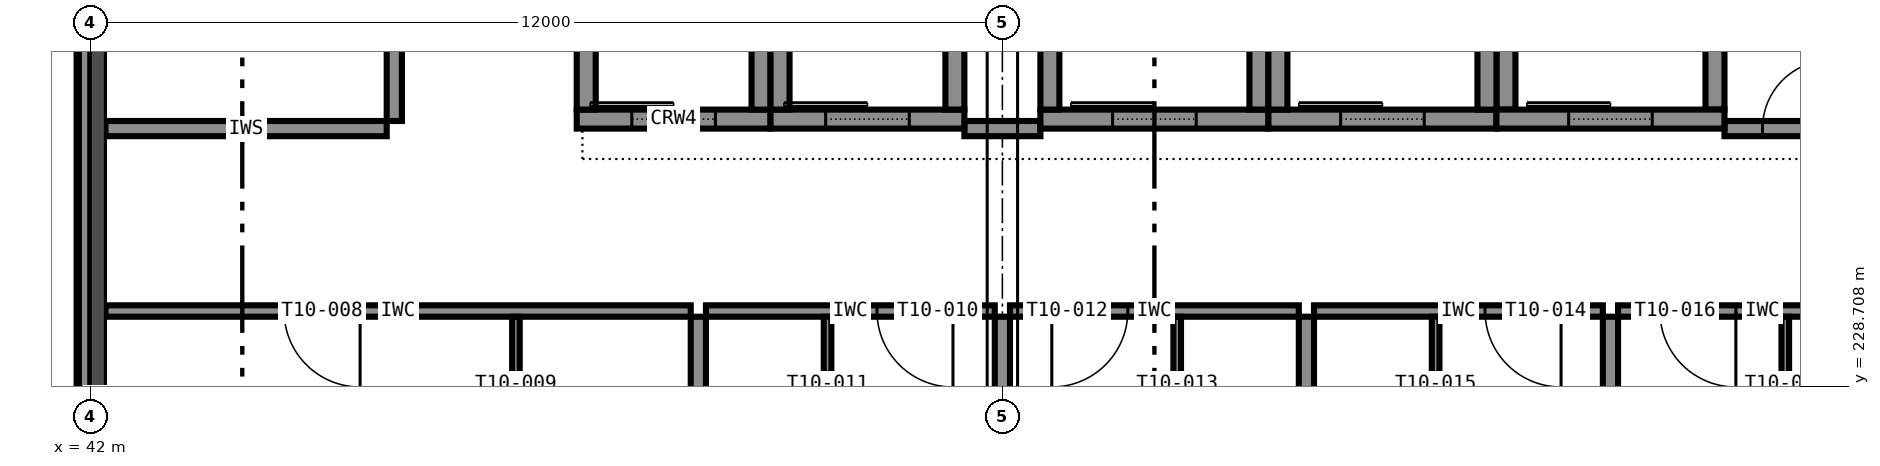
"""IFC4 building model, lengths in metres.
Left out: names, types, materials, properties, quantities, classifications, styles, units other than length and angle.
Written with IfcOpenShell. Run it as: python <this file> out.ifc"""

import sys

from ifc_helpers import new_model, si_unit, direction, frame, frame_2d, origin, place, context, subcontext, project, spatial, rectangle, extrude, element, fill, save


model = new_model("IFC4")
c1 = context("Model", 3, precision=1e-05, world=origin(), true_north=direction((0.0, 1.0)))
c2 = subcontext(c1, "Body", "Model", "MODEL_VIEW")
j1 = project(units=[si_unit("LENGTHUNIT", "METRE"), si_unit("PLANEANGLEUNIT", "RADIAN")], contexts=[c1])
p1 = place(None, origin())
s1 = spatial("IfcSite", under=j1, at=p1, CompositionType="ELEMENT")
p2 = place(p1, origin())
s2 = spatial("IfcBuilding", under=s1, at=p2, CompositionType="ELEMENT")
p3 = place(p2, frame((0.0, 0.0, 49.8)))
s3 = spatial("IfcBuildingStorey", under=s2, at=p3, CompositionType="ELEMENT", Elevation=49.8)
p4 = place(p3, frame((54.5, 232.225, 0.0), z_axis=(0.0, 0.0, 1.0), x_axis=(1.0, 0.0, 0.0)))
e1 = element("IfcWall", 1, at=p4, inside=s3, PredefinedType="SHEAR", context=c2, shape_type="SweptSolid", body=[
    extrude(rectangle(XDim=3.0, YDim=0.25, at=frame_2d((1.5, 0.0))), origin(), (0.0, 0.0, 1.0), 3.6),
])
p5 = place(p4, frame((0.95, 0.0, 0.0)))
e2 = element("IfcOpeningElement", 2, at=p5, cuts=e1, PredefinedType="OPENING", context=c2, shape_type="SweptSolid", body=[
    extrude(rectangle(XDim=1.1, YDim=2.1, at=frame_2d((0.55, 1.05))), frame((0.0, 0.135, 0.0), z_axis=(0.0, -1.0, 0.0), x_axis=(1.0, 0.0, 0.0)), (0.0, 0.0, 1.0), 0.27),
])
for number, where, z_axis, x_axis in (
    (3, (54.625, 232.35, 0.0), (0.0, 0.0, 1.0), (0.0, 1.0, 0.0)),
    (4, (57.375, 232.35, 0.0), (0.0, 0.0, 1.0), (0.0, 1.0, 0.0)),
):
    element("IfcWall", number, at=place(p3, frame(where, z_axis=z_axis, x_axis=x_axis)), inside=s3, PredefinedType="SHEAR", context=c2, shape_type="SweptSolid", body=[
        extrude(rectangle(XDim=3.3, YDim=0.25, at=frame_2d((1.65, 0.0))), origin(), (0.0, 0.0, 1.0), 3.6),
    ])
p6 = place(p3, frame((57.5, 232.225, 0.0), z_axis=(0.0, 0.0, 1.0), x_axis=(1.0, 0.0, 0.0)))
e5 = element("IfcWall", 5, at=p6, inside=s3, PredefinedType="SHEAR", context=c2, shape_type="SweptSolid", body=[
    extrude(rectangle(XDim=3.0, YDim=0.25, at=frame_2d((1.5, 0.0))), origin(), (0.0, 0.0, 1.0), 3.6),
])
p7 = place(p6, frame((0.95, 0.0, 0.0)))
e6 = element("IfcOpeningElement", 6, at=p7, cuts=e5, PredefinedType="OPENING", context=c2, shape_type="SweptSolid", body=[
    extrude(rectangle(XDim=1.1, YDim=2.1, at=frame_2d((0.55, 1.05))), frame((0.0, 0.135, 0.0), z_axis=(0.0, -1.0, 0.0), x_axis=(1.0, 0.0, 0.0)), (0.0, 0.0, 1.0), 0.27),
])
for number, where, z_axis, x_axis in (
    (7, (57.625, 232.35, 0.0), (0.0, 0.0, 1.0), (0.0, 1.0, 0.0)),
    (8, (60.375, 232.35, 0.0), (0.0, 0.0, 1.0), (0.0, 1.0, 0.0)),
):
    element("IfcWall", number, at=place(p3, frame(where, z_axis=z_axis, x_axis=x_axis)), inside=s3, PredefinedType="SHEAR", context=c2, shape_type="SweptSolid", body=[
        extrude(rectangle(XDim=3.3, YDim=0.25, at=frame_2d((1.65, 0.0))), origin(), (0.0, 0.0, 1.0), 3.6),
    ])
p8 = place(p3, frame((60.5, 232.225, 0.0), z_axis=(0.0, 0.0, 1.0), x_axis=(1.0, 0.0, 0.0)))
e9 = element("IfcWall", 9, at=p8, inside=s3, PredefinedType="SHEAR", context=c2, shape_type="SweptSolid", body=[
    extrude(rectangle(XDim=3.0, YDim=0.25, at=frame_2d((1.5, 0.0))), origin(), (0.0, 0.0, 1.0), 3.6),
])
p9 = place(p8, frame((0.95, 0.0, 0.0)))
e10 = element("IfcOpeningElement", 10, at=p9, cuts=e9, PredefinedType="OPENING", context=c2, shape_type="SweptSolid", body=[
    extrude(rectangle(XDim=1.1, YDim=2.1, at=frame_2d((0.55, 1.05))), frame((0.0, 0.135, 0.0), z_axis=(0.0, -1.0, 0.0), x_axis=(1.0, 0.0, 0.0)), (0.0, 0.0, 1.0), 0.27),
])
for number, where, z_axis, x_axis in (
    (11, (60.625, 232.35, 0.0), (0.0, 0.0, 1.0), (0.0, 1.0, 0.0)),
    (12, (63.375, 232.35, 0.0), (0.0, 0.0, 1.0), (0.0, 1.0, 0.0)),
):
    element("IfcWall", number, at=place(p3, frame(where, z_axis=z_axis, x_axis=x_axis)), inside=s3, PredefinedType="SHEAR", context=c2, shape_type="SweptSolid", body=[
        extrude(rectangle(XDim=3.3, YDim=0.25, at=frame_2d((1.65, 0.0))), origin(), (0.0, 0.0, 1.0), 3.6),
    ])
p10 = place(p3, frame((48.4, 232.225, 0.0), z_axis=(0.0, 0.0, 1.0), x_axis=(1.0, 0.0, 0.0)))
e13 = element("IfcWall", 13, at=p10, inside=s3, PredefinedType="SHEAR", context=c2, shape_type="SweptSolid", body=[
    extrude(rectangle(XDim=2.55, YDim=0.25, at=frame_2d((1.275, 0.0))), origin(), (0.0, 0.0, 1.0), 3.6),
])
p11 = place(p10, frame((0.725, 0.0, 0.0)))
e14 = element("IfcOpeningElement", 14, at=p11, cuts=e13, PredefinedType="OPENING", context=c2, shape_type="SweptSolid", body=[
    extrude(rectangle(XDim=1.1, YDim=2.1, at=frame_2d((0.55, 1.05))), frame((0.0, 0.135, 0.0), z_axis=(0.0, -1.0, 0.0), x_axis=(1.0, 0.0, 0.0)), (0.0, 0.0, 1.0), 0.27),
])
for number, where, z_axis, x_axis in (
    (15, (48.525, 232.35, 0.0), (0.0, 0.0, 1.0), (0.0, 1.0, 0.0)),
    (16, (50.825, 232.35, 0.0), (0.0, 0.0, 1.0), (0.0, 1.0, 0.0)),
):
    element("IfcWall", number, at=place(p3, frame(where, z_axis=z_axis, x_axis=x_axis)), inside=s3, PredefinedType="SHEAR", context=c2, shape_type="SweptSolid", body=[
        extrude(rectangle(XDim=3.3, YDim=0.25, at=frame_2d((1.65, 0.0))), origin(), (0.0, 0.0, 1.0), 3.6),
    ])
p12 = place(p3, frame((50.95, 232.225, 0.0), z_axis=(0.0, 0.0, 1.0), x_axis=(1.0, 0.0, 0.0)))
e17 = element("IfcWall", 17, at=p12, inside=s3, PredefinedType="SHEAR", context=c2, shape_type="SweptSolid", body=[
    extrude(rectangle(XDim=2.55, YDim=0.25, at=frame_2d((1.275, 0.0))), origin(), (0.0, 0.0, 1.0), 3.6),
])
p13 = place(p12, frame((0.725, 0.0, 0.0)))
e18 = element("IfcOpeningElement", 18, at=p13, cuts=e17, PredefinedType="OPENING", context=c2, shape_type="SweptSolid", body=[
    extrude(rectangle(XDim=1.1, YDim=2.1, at=frame_2d((0.55, 1.05))), frame((0.0, 0.135, 0.0), z_axis=(0.0, -1.0, 0.0), x_axis=(1.0, 0.0, 0.0)), (0.0, 0.0, 1.0), 0.27),
])
for number, where, z_axis, x_axis in (
    (19, (51.075, 232.35, 0.0), (0.0, 0.0, 1.0), (0.0, 1.0, 0.0)),
    (20, (53.375, 232.35, 0.0), (0.0, 0.0, 1.0), (0.0, 1.0, 0.0)),
):
    element("IfcWall", number, at=place(p3, frame(where, z_axis=z_axis, x_axis=x_axis)), inside=s3, PredefinedType="SHEAR", context=c2, shape_type="SweptSolid", body=[
        extrude(rectangle(XDim=3.3, YDim=0.25, at=frame_2d((1.65, 0.0))), origin(), (0.0, 0.0, 1.0), 3.6),
    ])
p14 = place(p3, frame((41.925, 233.65, 3.4), z_axis=(0.0, 0.0, 1.0), x_axis=(0.0, -1.0, 0.0)))
e21 = element("IfcWall", 21, at=p14, inside=s3, PredefinedType="STANDARD", context=c2, shape_type="SweptSolid", body=[
    extrude(rectangle(XDim=11.3, YDim=0.15, at=frame_2d((5.65, 0.0))), origin(), (0.0, 0.0, 1.0), 0.2),
])
p15 = place(p3, frame((42.2, 232.1, 0.0), z_axis=(0.0, 0.0, 1.0), x_axis=(1.0, 0.0, 0.0)))
e22 = element("IfcWall", 22, at=p15, inside=s3, PredefinedType="PARTITIONING", context=c2, shape_type="SweptSolid", body=[
    extrude(rectangle(XDim=3.7, YDim=0.2, at=frame_2d((1.85, 0.0))), origin(), (0.0, 0.0, 1.0), 3.4),
])
p16 = place(p3, frame((53.5, 232.1, 0.0), z_axis=(0.0, 0.0, 1.0), x_axis=(1.0, 0.0, 0.0)))
e23 = element("IfcWall", 23, at=p16, inside=s3, PredefinedType="PARTITIONING", context=c2, shape_type="SweptSolid", body=[
    extrude(rectangle(XDim=1.0, YDim=0.2, at=frame_2d((0.5, 0.0))), origin(), (0.0, 0.0, 1.0), 3.4),
])
p17 = place(p3, frame((63.5, 232.1, 0.0), z_axis=(0.0, 0.0, 1.0), x_axis=(1.0, 0.0, 0.0)))
e24 = element("IfcWall", 24, at=p17, inside=s3, PredefinedType="PARTITIONING", context=c2, shape_type="SweptSolid", body=[
    extrude(rectangle(XDim=1.9, YDim=0.2, at=frame_2d((0.95, 0.0))), origin(), (0.0, 0.0, 1.0), 3.4),
])
p18 = place(p17, frame((0.5, 0.0, 0.0)))
e25 = element("IfcOpeningElement", 25, at=p18, cuts=e24, PredefinedType="OPENING", context=c2, shape_type="SweptSolid", body=[
    extrude(rectangle(XDim=0.9, YDim=2.1, at=frame_2d((0.45, 1.05))), frame((0.0, 0.11, 0.0), z_axis=(0.0, -1.0, 0.0), x_axis=(1.0, 0.0, 0.0)), (0.0, 0.0, 1.0), 0.22),
])
p19 = place(p3, frame((46.0, 232.2, 0.0), z_axis=(0.0, 0.0, 1.0), x_axis=(0.0, 1.0, 0.0)))
e26 = element("IfcWall", 26, at=p19, inside=s3, PredefinedType="PARTITIONING", context=c2, shape_type="SweptSolid", body=[
    extrude(rectangle(XDim=3.6, YDim=0.2, at=frame_2d((1.8, 0.0))), origin(), (0.0, 0.0, 1.0), 3.4),
])
p20 = place(p19, frame((1.35, 0.0, 0.0)))
e27 = element("IfcOpeningElement", 27, at=p20, cuts=e26, PredefinedType="OPENING", context=c2, shape_type="SweptSolid", body=[
    extrude(rectangle(XDim=0.9, YDim=2.1, at=frame_2d((0.45, 1.05))), frame((0.0, 0.11, 0.0), z_axis=(0.0, -1.0, 0.0), x_axis=(1.0, 0.0, 0.0)), (0.0, 0.0, 1.0), 0.22),
])
p21 = place(p3, frame((49.9, 229.7, 0.0), z_axis=(0.0, 0.0, 1.0), x_axis=(-1.0, 0.0, 0.0)))
e28 = element("IfcWall", 28, at=p21, inside=s3, PredefinedType="PARTITIONING", context=c2, shape_type="SweptSolid", body=[
    extrude(rectangle(XDim=7.7, YDim=0.15, at=frame_2d((3.85, 0.0))), origin(), (0.0, 0.0, 1.0), 3.4),
])
p22 = place(p21, frame((4.35, 0.0, 0.0)))
e29 = element("IfcOpeningElement", 29, at=p22, cuts=e28, PredefinedType="OPENING", context=c2, shape_type="SweptSolid", body=[
    extrude(rectangle(XDim=1.0, YDim=2.1, at=frame_2d((0.5, 1.05))), frame((0.0, 0.085, 0.0), z_axis=(0.0, -1.0, 0.0), x_axis=(1.0, 0.0, 0.0)), (0.0, 0.0, 1.0), 0.17),
])
p23 = place(p3, frame((47.6, 226.75, 0.0), z_axis=(0.0, 0.0, 1.0), x_axis=(0.0, 1.0, 0.0)))
e30 = element("IfcWall", 30, at=p23, inside=s3, PredefinedType="PARTITIONING", context=c2, shape_type="SweptSolid", body=[
    extrude(rectangle(XDim=2.875, YDim=0.1, at=frame_2d((1.438, 0.0))), origin(), (0.0, 0.0, 1.0), 3.4),
])
p24 = place(p23, frame((1.038, 0.0, 0.0)))
e31 = element("IfcOpeningElement", 31, at=p24, cuts=e30, PredefinedType="OPENING", context=c2, shape_type="SweptSolid", body=[
    extrude(rectangle(XDim=0.8, YDim=2.1, at=frame_2d((0.4, 1.05))), frame((0.0, 0.06, 0.0), z_axis=(0.0, -1.0, 0.0), x_axis=(1.0, 0.0, 0.0)), (0.0, 0.0, 1.0), 0.12),
])
p25 = place(p3, frame((53.9, 229.7, 0.0), z_axis=(0.0, 0.0, 1.0), x_axis=(-1.0, 0.0, 0.0)))
e32 = element("IfcWall", 32, at=p25, inside=s3, PredefinedType="PARTITIONING", context=c2, shape_type="SweptSolid", body=[
    extrude(rectangle(XDim=3.8, YDim=0.15, at=frame_2d((1.9, 0.0))), origin(), (0.0, 0.0, 1.0), 3.4),
])
p26 = place(p25, frame((0.55, 0.0, 0.0)))
e33 = element("IfcOpeningElement", 33, at=p26, cuts=e32, PredefinedType="OPENING", context=c2, shape_type="SweptSolid", body=[
    extrude(rectangle(XDim=1.0, YDim=2.1, at=frame_2d((0.5, 1.05))), frame((0.0, 0.085, 0.0), z_axis=(0.0, -1.0, 0.0), x_axis=(1.0, 0.0, 0.0)), (0.0, 0.0, 1.0), 0.17),
])
p27 = place(p3, frame((51.7, 229.625, 0.0), z_axis=(0.0, 0.0, 1.0), x_axis=(0.0, -1.0, 0.0)))
e34 = element("IfcWall", 34, at=p27, inside=s3, PredefinedType="PARTITIONING", context=c2, shape_type="SweptSolid", body=[
    extrude(rectangle(XDim=2.875, YDim=0.1, at=frame_2d((1.438, 0.0))), origin(), (0.0, 0.0, 1.0), 3.4),
])
p28 = place(p27, frame((1.038, 0.0, 0.0)))
e35 = element("IfcOpeningElement", 35, at=p28, cuts=e34, PredefinedType="OPENING", context=c2, shape_type="SweptSolid", body=[
    extrude(rectangle(XDim=0.8, YDim=2.1, at=frame_2d((0.4, 1.05))), frame((0.0, 0.06, 0.0), z_axis=(0.0, -1.0, 0.0), x_axis=(1.0, 0.0, 0.0)), (0.0, 0.0, 1.0), 0.12),
])
p29 = place(p3, frame((57.9, 229.7, 0.0), z_axis=(0.0, 0.0, 1.0), x_axis=(-1.0, 0.0, 0.0)))
e36 = element("IfcWall", 36, at=p29, inside=s3, PredefinedType="PARTITIONING", context=c2, shape_type="SweptSolid", body=[
    extrude(rectangle(XDim=3.8, YDim=0.15, at=frame_2d((1.9, 0.0))), origin(), (0.0, 0.0, 1.0), 3.4),
])
p30 = place(p29, frame((2.25, 0.0, 0.0)))
e37 = element("IfcOpeningElement", 37, at=p30, cuts=e36, PredefinedType="OPENING", context=c2, shape_type="SweptSolid", body=[
    extrude(rectangle(XDim=1.0, YDim=2.1, at=frame_2d((0.5, 1.05))), frame((0.0, 0.085, 0.0), z_axis=(0.0, -1.0, 0.0), x_axis=(1.0, 0.0, 0.0)), (0.0, 0.0, 1.0), 0.17),
])
p31 = place(p3, frame((56.3, 226.75, 0.0), z_axis=(0.0, 0.0, 1.0), x_axis=(0.0, 1.0, 0.0)))
e38 = element("IfcWall", 38, at=p31, inside=s3, PredefinedType="PARTITIONING", context=c2, shape_type="SweptSolid", body=[
    extrude(rectangle(XDim=2.875, YDim=0.1, at=frame_2d((1.438, 0.0))), origin(), (0.0, 0.0, 1.0), 3.4),
])
p32 = place(p31, frame((1.038, 0.0, 0.0)))
e39 = element("IfcOpeningElement", 39, at=p32, cuts=e38, PredefinedType="OPENING", context=c2, shape_type="SweptSolid", body=[
    extrude(rectangle(XDim=0.8, YDim=2.1, at=frame_2d((0.4, 1.05))), frame((0.0, 0.06, 0.0), z_axis=(0.0, -1.0, 0.0), x_axis=(1.0, 0.0, 0.0)), (0.0, 0.0, 1.0), 0.12),
])
p33 = place(p3, frame((61.9, 229.7, 0.0), z_axis=(0.0, 0.0, 1.0), x_axis=(-1.0, 0.0, 0.0)))
e40 = element("IfcWall", 40, at=p33, inside=s3, PredefinedType="PARTITIONING", context=c2, shape_type="SweptSolid", body=[
    extrude(rectangle(XDim=3.8, YDim=0.15, at=frame_2d((1.9, 0.0))), origin(), (0.0, 0.0, 1.0), 3.4),
])
p34 = place(p33, frame((0.55, 0.0, 0.0)))
e41 = element("IfcOpeningElement", 41, at=p34, cuts=e40, PredefinedType="OPENING", context=c2, shape_type="SweptSolid", body=[
    extrude(rectangle(XDim=1.0, YDim=2.1, at=frame_2d((0.5, 1.05))), frame((0.0, 0.085, 0.0), z_axis=(0.0, -1.0, 0.0), x_axis=(1.0, 0.0, 0.0)), (0.0, 0.0, 1.0), 0.17),
])
p35 = place(p3, frame((59.7, 229.625, 0.0), z_axis=(0.0, 0.0, 1.0), x_axis=(0.0, -1.0, 0.0)))
e42 = element("IfcWall", 42, at=p35, inside=s3, PredefinedType="PARTITIONING", context=c2, shape_type="SweptSolid", body=[
    extrude(rectangle(XDim=2.875, YDim=0.1, at=frame_2d((1.438, 0.0))), origin(), (0.0, 0.0, 1.0), 3.4),
])
p36 = place(p35, frame((1.038, 0.0, 0.0)))
e43 = element("IfcOpeningElement", 43, at=p36, cuts=e42, PredefinedType="OPENING", context=c2, shape_type="SweptSolid", body=[
    extrude(rectangle(XDim=0.8, YDim=2.1, at=frame_2d((0.4, 1.05))), frame((0.0, 0.06, 0.0), z_axis=(0.0, -1.0, 0.0), x_axis=(1.0, 0.0, 0.0)), (0.0, 0.0, 1.0), 0.12),
])
p37 = place(p3, frame((65.9, 229.7, 0.0), z_axis=(0.0, 0.0, 1.0), x_axis=(-1.0, 0.0, 0.0)))
e44 = element("IfcWall", 44, at=p37, inside=s3, PredefinedType="PARTITIONING", context=c2, shape_type="SweptSolid", body=[
    extrude(rectangle(XDim=3.8, YDim=0.15, at=frame_2d((1.9, 0.0))), origin(), (0.0, 0.0, 1.0), 3.4),
])
p38 = place(p37, frame((2.25, 0.0, 0.0)))
e45 = element("IfcOpeningElement", 45, at=p38, cuts=e44, PredefinedType="OPENING", context=c2, shape_type="SweptSolid", body=[
    extrude(rectangle(XDim=1.0, YDim=2.1, at=frame_2d((0.5, 1.05))), frame((0.0, 0.085, 0.0), z_axis=(0.0, -1.0, 0.0), x_axis=(1.0, 0.0, 0.0)), (0.0, 0.0, 1.0), 0.17),
])
p39 = place(p3, frame((64.3, 226.75, 0.0), z_axis=(0.0, 0.0, 1.0), x_axis=(0.0, 1.0, 0.0)))
e46 = element("IfcWall", 46, at=p39, inside=s3, PredefinedType="PARTITIONING", context=c2, shape_type="SweptSolid", body=[
    extrude(rectangle(XDim=2.875, YDim=0.1, at=frame_2d((1.438, 0.0))), origin(), (0.0, 0.0, 1.0), 3.4),
])
p40 = place(p39, frame((1.038, 0.0, 0.0)))
e47 = element("IfcOpeningElement", 47, at=p40, cuts=e46, PredefinedType="OPENING", context=c2, shape_type="SweptSolid", body=[
    extrude(rectangle(XDim=0.8, YDim=2.1, at=frame_2d((0.4, 1.05))), frame((0.0, 0.06, 0.0), z_axis=(0.0, -1.0, 0.0), x_axis=(1.0, 0.0, 0.0)), (0.0, 0.0, 1.0), 0.12),
])
p41 = place(p3, frame((50.0, 222.3, 0.0), z_axis=(0.0, 0.0, 1.0), x_axis=(0.0, 1.0, 0.0)))
e48 = element("IfcWall", 48, at=p41, inside=s3, PredefinedType="PARTITIONING", context=c2, shape_type="SweptSolid", body=[
    extrude(rectangle(XDim=7.325, YDim=0.2, at=frame_2d((3.663, 0.0))), origin(), (0.0, 0.0, 1.0), 3.4),
])
p42 = place(p3, frame((54.0, 222.35, 0.0), z_axis=(0.0, 0.0, 1.0), x_axis=(0.0, 1.0, 0.0)))
e49 = element("IfcWall", 49, at=p42, inside=s3, PredefinedType="PARTITIONING", context=c2, shape_type="SweptSolid", body=[
    extrude(rectangle(XDim=7.275, YDim=0.2, at=frame_2d((3.637, 0.0))), origin(), (0.0, 0.0, 1.0), 2.6),
])
for number, where, z_axis, x_axis in (
    (50, (58.0, 222.3, 0.0), (0.0, 0.0, 1.0), (0.0, 1.0, 0.0)),
    (51, (62.0, 222.3, 0.0), (0.0, 0.0, 1.0), (0.0, 1.0, 0.0)),
):
    element("IfcWall", number, at=place(p3, frame(where, z_axis=z_axis, x_axis=x_axis)), inside=s3, PredefinedType="PARTITIONING", context=c2, shape_type="SweptSolid", body=[
        extrude(rectangle(XDim=7.325, YDim=0.2, at=frame_2d((3.663, 0.0))), origin(), (0.0, 0.0, 1.0), 3.4),
    ])
p43 = place(p18, origin())
e52 = element("IfcDoor", 52, at=p43, inside=s3, OperationType="SINGLE_SWING_RIGHT", PredefinedType="DOOR", context=c2, shape_type="SweptSolid", body=[
    extrude(rectangle(XDim=0.9, YDim=2.1, at=frame_2d((0.45, 1.05))), frame((0.0, 0.025, 0.0), z_axis=(0.0, -1.0, 0.0), x_axis=(1.0, 0.0, 0.0)), (0.0, 0.0, 1.0), 0.05),
])
fill(e25, e52)
p44 = place(p22, origin())
e53 = element("IfcDoor", 53, at=p44, inside=s3, OperationType="SINGLE_SWING_LEFT", PredefinedType="DOOR", context=c2, shape_type="SweptSolid", body=[
    extrude(rectangle(XDim=1.0, YDim=2.1, at=frame_2d((0.5, 1.05))), frame((0.0, 0.025, 0.0), z_axis=(0.0, -1.0, 0.0), x_axis=(1.0, 0.0, 0.0)), (0.0, 0.0, 1.0), 0.05),
])
fill(e29, e53)
p45 = place(p26, origin())
e54 = element("IfcDoor", 54, at=p45, inside=s3, OperationType="SINGLE_SWING_LEFT", PredefinedType="DOOR", context=c2, shape_type="SweptSolid", body=[
    extrude(rectangle(XDim=1.0, YDim=2.1, at=frame_2d((0.5, 1.05))), frame((0.0, 0.025, 0.0), z_axis=(0.0, -1.0, 0.0), x_axis=(1.0, 0.0, 0.0)), (0.0, 0.0, 1.0), 0.05),
])
fill(e33, e54)
p46 = place(p30, origin())
e55 = element("IfcDoor", 55, at=p46, inside=s3, OperationType="SINGLE_SWING_RIGHT", PredefinedType="DOOR", context=c2, shape_type="SweptSolid", body=[
    extrude(rectangle(XDim=1.0, YDim=2.1, at=frame_2d((0.5, 1.05))), frame((0.0, 0.025, 0.0), z_axis=(0.0, -1.0, 0.0), x_axis=(1.0, 0.0, 0.0)), (0.0, 0.0, 1.0), 0.05),
])
fill(e37, e55)
p47 = place(p34, origin())
e56 = element("IfcDoor", 56, at=p47, inside=s3, OperationType="SINGLE_SWING_LEFT", PredefinedType="DOOR", context=c2, shape_type="SweptSolid", body=[
    extrude(rectangle(XDim=1.0, YDim=2.1, at=frame_2d((0.5, 1.05))), frame((0.0, 0.025, 0.0), z_axis=(0.0, -1.0, 0.0), x_axis=(1.0, 0.0, 0.0)), (0.0, 0.0, 1.0), 0.05),
])
fill(e41, e56)
p48 = place(p38, origin())
e57 = element("IfcDoor", 57, at=p48, inside=s3, OperationType="SINGLE_SWING_LEFT", PredefinedType="DOOR", context=c2, shape_type="SweptSolid", body=[
    extrude(rectangle(XDim=1.0, YDim=2.1, at=frame_2d((0.5, 1.05))), frame((0.0, 0.025, 0.0), z_axis=(0.0, -1.0, 0.0), x_axis=(1.0, 0.0, 0.0)), (0.0, 0.0, 1.0), 0.05),
])
fill(e45, e57)
p49 = place(p5, origin())
e58 = element("IfcDoor", 58, at=p49, inside=s3, OperationType="SLIDING_TO_LEFT", PredefinedType="DOOR", context=c2, shape_type="SweptSolid", body=[
    extrude(rectangle(XDim=1.1, YDim=2.1, at=frame_2d((0.55, 1.05))), frame((0.0, 0.025, 0.0), z_axis=(0.0, -1.0, 0.0), x_axis=(1.0, 0.0, 0.0)), (0.0, 0.0, 1.0), 0.05),
])
fill(e2, e58)
p50 = place(p7, origin())
e59 = element("IfcDoor", 59, at=p50, inside=s3, OperationType="SLIDING_TO_LEFT", PredefinedType="DOOR", context=c2, shape_type="SweptSolid", body=[
    extrude(rectangle(XDim=1.1, YDim=2.1, at=frame_2d((0.55, 1.05))), frame((0.0, 0.025, 0.0), z_axis=(0.0, -1.0, 0.0), x_axis=(1.0, 0.0, 0.0)), (0.0, 0.0, 1.0), 0.05),
])
fill(e6, e59)
p51 = place(p9, origin())
e60 = element("IfcDoor", 60, at=p51, inside=s3, OperationType="SLIDING_TO_LEFT", PredefinedType="DOOR", context=c2, shape_type="SweptSolid", body=[
    extrude(rectangle(XDim=1.1, YDim=2.1, at=frame_2d((0.55, 1.05))), frame((0.0, 0.025, 0.0), z_axis=(0.0, -1.0, 0.0), x_axis=(1.0, 0.0, 0.0)), (0.0, 0.0, 1.0), 0.05),
])
fill(e10, e60)
p52 = place(p11, origin())
e61 = element("IfcDoor", 61, at=p52, inside=s3, OperationType="SLIDING_TO_LEFT", PredefinedType="DOOR", context=c2, shape_type="SweptSolid", body=[
    extrude(rectangle(XDim=1.1, YDim=2.1, at=frame_2d((0.55, 1.05))), frame((0.0, 0.025, 0.0), z_axis=(0.0, -1.0, 0.0), x_axis=(1.0, 0.0, 0.0)), (0.0, 0.0, 1.0), 0.05),
])
fill(e14, e61)
p53 = place(p13, origin())
e62 = element("IfcDoor", 62, at=p53, inside=s3, OperationType="SLIDING_TO_LEFT", PredefinedType="DOOR", context=c2, shape_type="SweptSolid", body=[
    extrude(rectangle(XDim=1.1, YDim=2.1, at=frame_2d((0.55, 1.05))), frame((0.0, 0.025, 0.0), z_axis=(0.0, -1.0, 0.0), x_axis=(1.0, 0.0, 0.0)), (0.0, 0.0, 1.0), 0.05),
])
fill(e18, e62)
save(model, sys.argv[1])
